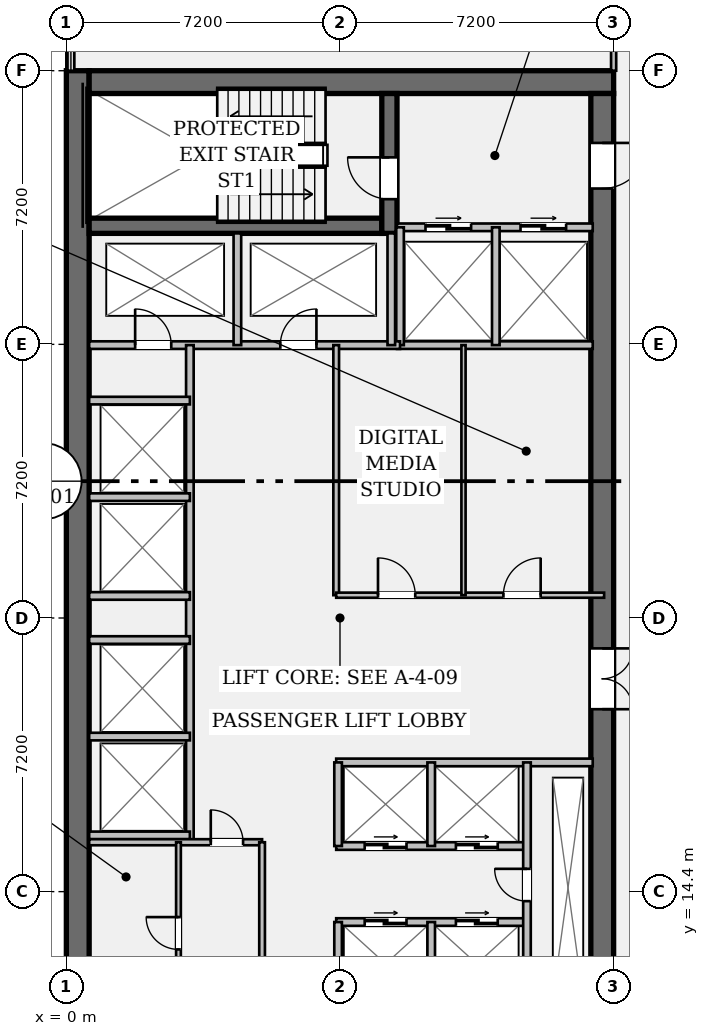
"""IFC4 building model, lengths in metres.
Left out: names, types, materials, properties, quantities, classifications, styles, units other than length and angle.
Written with IfcOpenShell. Run it as: python <this file> out.ifc"""

import sys

from ifc_helpers import new_model, si_unit, direction, frame, frame_2d, origin, place, context, subcontext, project, spatial, rectangle, extrude, element, fill, save


model = new_model("IFC4")
c1 = context("Model", 3, precision=1e-05, world=origin(), true_north=direction((0.0, 1.0)))
c2 = subcontext(c1, "Body", "Model", "MODEL_VIEW")
j1 = project(units=[si_unit("LENGTHUNIT", "METRE"), si_unit("PLANEANGLEUNIT", "RADIAN")], contexts=[c1])
p1 = place(None, origin())
s1 = spatial("IfcSite", under=j1, at=p1, CompositionType="ELEMENT")
p2 = place(p1, origin())
s2 = spatial("IfcBuilding", under=s1, at=p2, CompositionType="ELEMENT")
p3 = place(p2, frame((0.0, 0.0, 159.95)))
s3 = spatial("IfcBuildingStorey", under=s2, at=p3, CompositionType="ELEMENT", Elevation=159.95)
p4 = place(p3, frame((0.3, 7.2, 0.0), z_axis=(0.0, 0.0, 1.0), x_axis=(0.0, 1.0, 0.0)))
e1 = element("IfcWall", 1, at=p4, inside=s3, PredefinedType="SHEAR", context=c2, shape_type="SweptSolid", body=[
    extrude(rectangle(XDim=28.8, YDim=0.6, at=frame_2d((14.4, 0.0))), origin(), (0.0, 0.0, 1.0), 3.58),
])
p5 = place(p3, frame((0.6, 35.7, 0.0), z_axis=(0.0, 0.0, 1.0), x_axis=(1.0, 0.0, 0.0)))
e2 = element("IfcWall", 2, at=p5, inside=s3, PredefinedType="SHEAR", context=c2, shape_type="SweptSolid", body=[
    extrude(rectangle(XDim=13.8, YDim=0.6, at=frame_2d((6.9, 0.0))), origin(), (0.0, 0.0, 1.0), 3.58),
])
p6 = place(p3, frame((14.1, 35.4, 0.0), z_axis=(0.0, 0.0, 1.0), x_axis=(0.0, -1.0, 0.0)))
e3 = element("IfcWall", 3, at=p6, inside=s3, PredefinedType="SHEAR", context=c2, shape_type="SweptSolid", body=[
    extrude(rectangle(XDim=27.6, YDim=0.6, at=frame_2d((13.8, 0.0))), origin(), (0.0, 0.0, 1.0), 3.58),
])
p7 = place(p6, frame((1.3, 0.0, 0.0)))
e4 = element("IfcOpeningElement", 4, at=p7, cuts=e3, PredefinedType="OPENING", context=c2, shape_type="SweptSolid", body=[
    extrude(rectangle(XDim=1.2, YDim=2.15, at=frame_2d((0.6, 1.075))), frame((0.0, 0.312, 0.0), z_axis=(0.0, -1.0, 0.0), x_axis=(1.0, 0.0, 0.0)), (0.0, 0.0, 1.0), 0.624),
])
p8 = place(p6, frame((25.25, 0.0, 0.0)))
e5 = element("IfcOpeningElement", 5, at=p8, cuts=e3, PredefinedType="OPENING", context=c2, shape_type="SweptSolid", body=[
    extrude(rectangle(XDim=1.2, YDim=2.15, at=frame_2d((0.6, 1.075))), frame((0.0, 0.312, 0.0), z_axis=(0.0, -1.0, 0.0), x_axis=(1.0, 0.0, 0.0)), (0.0, 0.0, 1.0), 0.624),
])
p9 = place(p6, frame((14.6, 0.0, 0.0)))
e6 = element("IfcOpeningElement", 6, at=p9, cuts=e3, PredefinedType="OPENING", context=c2, shape_type="SweptSolid", body=[
    extrude(rectangle(XDim=1.6, YDim=2.2, at=frame_2d((0.8, 1.1))), frame((0.0, 0.312, 0.0), z_axis=(0.0, -1.0, 0.0), x_axis=(1.0, 0.0, 0.0)), (0.0, 0.0, 1.0), 0.624),
])
p10 = place(p3, frame((0.6, 31.92, 0.0), z_axis=(0.0, 0.0, 1.0), x_axis=(1.0, 0.0, 0.0)))
e7 = element("IfcWall", 7, at=p10, inside=s3, PredefinedType="SHEAR", context=c2, shape_type="SweptSolid", body=[
    extrude(rectangle(XDim=7.7, YDim=0.4, at=frame_2d((3.85, 0.0))), origin(), (0.0, 0.0, 1.0), 3.58),
])
p11 = place(p3, frame((8.5, 31.72, 0.0), z_axis=(0.0, 0.0, 1.0), x_axis=(0.0, 1.0, 0.0)))
e8 = element("IfcWall", 8, at=p11, inside=s3, PredefinedType="SHEAR", context=c2, shape_type="SweptSolid", body=[
    extrude(rectangle(XDim=3.68, YDim=0.4, at=frame_2d((1.84, 0.0))), origin(), (0.0, 0.0, 1.0), 3.58),
])
p12 = place(p11, frame((0.9, 0.0, 0.0)))
e9 = element("IfcOpeningElement", 9, at=p12, cuts=e8, PredefinedType="OPENING", context=c2, shape_type="SweptSolid", body=[
    extrude(rectangle(XDim=1.1, YDim=2.15, at=frame_2d((0.55, 1.075))), frame((0.0, 0.212, 0.0), z_axis=(0.0, -1.0, 0.0), x_axis=(1.0, 0.0, 0.0)), (0.0, 0.0, 1.0), 0.424),
])
p13 = place(p3, frame((8.7, 31.88, 0.0), z_axis=(0.0, 0.0, 1.0), x_axis=(1.0, 0.0, 0.0)))
e10 = element("IfcWall", 10, at=p13, inside=s3, PredefinedType="PARTITIONING", context=c2, shape_type="SweptSolid", body=[
    extrude(rectangle(XDim=5.15, YDim=0.2, at=frame_2d((2.575, 0.0))), origin(), (0.0, 0.0, 1.0), 3.58),
])
p14 = place(p13, frame((0.75, 0.0, 0.0)))
e11 = element("IfcOpeningElement", 11, at=p14, cuts=e10, PredefinedType="OPENING", context=c2, shape_type="SweptSolid", body=[
    extrude(rectangle(XDim=1.2, YDim=2.2, at=frame_2d((0.6, 1.1))), frame((0.0, 0.112, 0.0), z_axis=(0.0, -1.0, 0.0), x_axis=(1.0, 0.0, 0.0)), (0.0, 0.0, 1.0), 0.224),
])
p15 = place(p13, frame((3.25, 0.0, 0.0)))
e12 = element("IfcOpeningElement", 12, at=p15, cuts=e10, PredefinedType="OPENING", context=c2, shape_type="SweptSolid", body=[
    extrude(rectangle(XDim=1.2, YDim=2.2, at=frame_2d((0.6, 1.1))), frame((0.0, 0.112, 0.0), z_axis=(0.0, -1.0, 0.0), x_axis=(1.0, 0.0, 0.0)), (0.0, 0.0, 1.0), 0.224),
])
p16 = place(p3, frame((8.7, 28.78, 0.0), z_axis=(0.0, 0.0, 1.0), x_axis=(1.0, 0.0, 0.0)))
e13 = element("IfcWall", 13, at=p16, inside=s3, PredefinedType="PARTITIONING", context=c2, shape_type="SweptSolid", body=[
    extrude(rectangle(XDim=5.15, YDim=0.2, at=frame_2d((2.575, 0.0))), origin(), (0.0, 0.0, 1.0), 3.58),
])
for number, where, z_axis, x_axis in (
    (14, (8.78, 28.78, 0.0), (0.0, 0.0, 1.0), (0.0, 1.0, 0.0)),
    (15, (11.3, 28.78, 0.0), (0.0, 0.0, 1.0), (0.0, 1.0, 0.0)),
):
    element("IfcWall", number, at=place(p3, frame(where, z_axis=z_axis, x_axis=x_axis)), inside=s3, PredefinedType="PARTITIONING", context=c2, shape_type="SweptSolid", body=[
        extrude(rectangle(XDim=3.1, YDim=0.2, at=frame_2d((1.55, 0.0))), origin(), (0.0, 0.0, 1.0), 3.58),
    ])
p17 = place(p3, frame((0.6, 28.78, 0.0), z_axis=(0.0, 0.0, 1.0), x_axis=(1.0, 0.0, 0.0)))
e16 = element("IfcWall", 16, at=p17, inside=s3, PredefinedType="PARTITIONING", context=c2, shape_type="SweptSolid", body=[
    extrude(rectangle(XDim=8.18, YDim=0.2, at=frame_2d((4.09, 0.0))), origin(), (0.0, 0.0, 1.0), 3.58),
])
p18 = place(p17, frame((1.21, 0.0, 0.0)))
e17 = element("IfcOpeningElement", 17, at=p18, cuts=e16, PredefinedType="OPENING", context=c2, shape_type="SweptSolid", body=[
    extrude(rectangle(XDim=0.95, YDim=2.15, at=frame_2d((0.475, 1.075))), frame((0.0, 0.112, 0.0), z_axis=(0.0, -1.0, 0.0), x_axis=(1.0, 0.0, 0.0)), (0.0, 0.0, 1.0), 0.224),
])
p19 = place(p17, frame((5.03, 0.0, 0.0)))
e18 = element("IfcOpeningElement", 18, at=p19, cuts=e16, PredefinedType="OPENING", context=c2, shape_type="SweptSolid", body=[
    extrude(rectangle(XDim=0.95, YDim=2.15, at=frame_2d((0.475, 1.075))), frame((0.0, 0.112, 0.0), z_axis=(0.0, -1.0, 0.0), x_axis=(1.0, 0.0, 0.0)), (0.0, 0.0, 1.0), 0.224),
])
for number, where, z_axis, x_axis in (
    (19, (4.5, 28.78, 0.0), (0.0, 0.0, 1.0), (0.0, 1.0, 0.0)),
    (20, (8.55, 28.78, 0.0), (0.0, 0.0, 1.0), (0.0, 1.0, 0.0)),
):
    element("IfcWall", number, at=place(p3, frame(where, z_axis=z_axis, x_axis=x_axis)), inside=s3, PredefinedType="PARTITIONING", context=c2, shape_type="SweptSolid", body=[
        extrude(rectangle(XDim=2.94, YDim=0.2, at=frame_2d((1.47, 0.0))), origin(), (0.0, 0.0, 1.0), 3.58),
    ])
p20 = place(p3, frame((3.25, 15.7, 0.0), z_axis=(0.0, 0.0, 1.0), x_axis=(0.0, 1.0, 0.0)))
e21 = element("IfcWall", 21, at=p20, inside=s3, PredefinedType="PARTITIONING", context=c2, shape_type="SweptSolid", body=[
    extrude(rectangle(XDim=13.08, YDim=0.2, at=frame_2d((6.54, 0.0))), origin(), (0.0, 0.0, 1.0), 3.58),
])
for number, where, z_axis, x_axis in (
    (22, (0.6, 15.88, 0.0), (0.0, 0.0, 1.0), (1.0, 0.0, 0.0)),
    (23, (0.6, 18.48, 0.0), (0.0, 0.0, 1.0), (1.0, 0.0, 0.0)),
    (24, (0.6, 22.18, 0.0), (0.0, 0.0, 1.0), (1.0, 0.0, 0.0)),
    (25, (0.6, 24.78, 0.0), (0.0, 0.0, 1.0), (1.0, 0.0, 0.0)),
    (26, (0.6, 21.02, 0.0), (0.0, 0.0, 1.0), (1.0, 0.0, 0.0)),
    (27, (0.6, 27.32, 0.0), (0.0, 0.0, 1.0), (1.0, 0.0, 0.0)),
):
    element("IfcWall", number, at=place(p3, frame(where, z_axis=z_axis, x_axis=x_axis)), inside=s3, PredefinedType="PARTITIONING", context=c2, shape_type="SweptSolid", body=[
        extrude(rectangle(XDim=2.65, YDim=0.2, at=frame_2d((1.325, 0.0))), origin(), (0.0, 0.0, 1.0), 3.58),
    ])
p21 = place(p3, frame((7.1, 22.2, 0.0), z_axis=(0.0, 0.0, 1.0), x_axis=(0.0, 1.0, 0.0)))
e28 = element("IfcWall", 28, at=p21, inside=s3, PredefinedType="PARTITIONING", context=c2, shape_type="SweptSolid", body=[
    extrude(rectangle(XDim=6.58, YDim=0.15, at=frame_2d((3.29, 0.0))), origin(), (0.0, 0.0, 1.0), 3.58),
])
p22 = place(p3, frame((7.1, 22.2, 0.0), z_axis=(0.0, 0.0, 1.0), x_axis=(1.0, 0.0, 0.0)))
e29 = element("IfcWall", 29, at=p22, inside=s3, PredefinedType="PARTITIONING", context=c2, shape_type="SweptSolid", body=[
    extrude(rectangle(XDim=7.05, YDim=0.135, at=frame_2d((3.525, 0.0))), origin(), (0.0, 0.0, 1.0), 3.58),
])
p23 = place(p22, frame((1.1, 0.0, 0.0)))
e30 = element("IfcOpeningElement", 30, at=p23, cuts=e29, PredefinedType="OPENING", context=c2, shape_type="SweptSolid", body=[
    extrude(rectangle(XDim=0.98, YDim=2.15, at=frame_2d((0.49, 1.075))), frame((0.0, 0.08, 0.0), z_axis=(0.0, -1.0, 0.0), x_axis=(1.0, 0.0, 0.0)), (0.0, 0.0, 1.0), 0.159),
])
p24 = place(p22, frame((4.4, 0.0, 0.0)))
e31 = element("IfcOpeningElement", 31, at=p24, cuts=e29, PredefinedType="OPENING", context=c2, shape_type="SweptSolid", body=[
    extrude(rectangle(XDim=0.98, YDim=2.15, at=frame_2d((0.49, 1.075))), frame((0.0, 0.08, 0.0), z_axis=(0.0, -1.0, 0.0), x_axis=(1.0, 0.0, 0.0)), (0.0, 0.0, 1.0), 0.159),
])
p25 = place(p3, frame((10.45, 22.2, 0.0), z_axis=(0.0, 0.0, 1.0), x_axis=(0.0, 1.0, 0.0)))
e32 = element("IfcWall", 32, at=p25, inside=s3, PredefinedType="PARTITIONING", context=c2, shape_type="SweptSolid", body=[
    extrude(rectangle(XDim=6.58, YDim=0.11, at=frame_2d((3.29, 0.0))), origin(), (0.0, 0.0, 1.0), 3.58),
])
p26 = place(p3, frame((7.1, 17.8, 0.0), z_axis=(0.0, 0.0, 1.0), x_axis=(1.0, 0.0, 0.0)))
e33 = element("IfcWall", 33, at=p26, inside=s3, PredefinedType="PARTITIONING", context=c2, shape_type="SweptSolid", body=[
    extrude(rectangle(XDim=6.75, YDim=0.2, at=frame_2d((3.375, 0.0))), origin(), (0.0, 0.0, 1.0), 3.58),
])
p27 = place(p3, frame((7.1, 15.6, 0.0), z_axis=(0.0, 0.0, 1.0), x_axis=(1.0, 0.0, 0.0)))
e34 = element("IfcWall", 34, at=p27, inside=s3, PredefinedType="PARTITIONING", context=c2, shape_type="SweptSolid", body=[
    extrude(rectangle(XDim=5.02, YDim=0.2, at=frame_2d((2.51, 0.0))), origin(), (0.0, 0.0, 1.0), 3.58),
])
p28 = place(p27, frame((0.75, 0.0, 0.0)))
e35 = element("IfcOpeningElement", 35, at=p28, cuts=e34, PredefinedType="OPENING", context=c2, shape_type="SweptSolid", body=[
    extrude(rectangle(XDim=1.1, YDim=2.2, at=frame_2d((0.55, 1.1))), frame((0.0, 0.112, 0.0), z_axis=(0.0, -1.0, 0.0), x_axis=(1.0, 0.0, 0.0)), (0.0, 0.0, 1.0), 0.224),
])
p29 = place(p27, frame((3.15, 0.0, 0.0)))
e36 = element("IfcOpeningElement", 36, at=p29, cuts=e34, PredefinedType="OPENING", context=c2, shape_type="SweptSolid", body=[
    extrude(rectangle(XDim=1.1, YDim=2.2, at=frame_2d((0.55, 1.1))), frame((0.0, 0.112, 0.0), z_axis=(0.0, -1.0, 0.0), x_axis=(1.0, 0.0, 0.0)), (0.0, 0.0, 1.0), 0.224),
])
p30 = place(p3, frame((7.1, 13.6, 0.0), z_axis=(0.0, 0.0, 1.0), x_axis=(1.0, 0.0, 0.0)))
e37 = element("IfcWall", 37, at=p30, inside=s3, PredefinedType="PARTITIONING", context=c2, shape_type="SweptSolid", body=[
    extrude(rectangle(XDim=5.02, YDim=0.2, at=frame_2d((2.51, 0.0))), origin(), (0.0, 0.0, 1.0), 3.58),
])
p31 = place(p30, frame((0.75, 0.0, 0.0)))
e38 = element("IfcOpeningElement", 38, at=p31, cuts=e37, PredefinedType="OPENING", context=c2, shape_type="SweptSolid", body=[
    extrude(rectangle(XDim=1.1, YDim=2.2, at=frame_2d((0.55, 1.1))), frame((0.0, 0.112, 0.0), z_axis=(0.0, -1.0, 0.0), x_axis=(1.0, 0.0, 0.0)), (0.0, 0.0, 1.0), 0.224),
])
p32 = place(p30, frame((3.15, 0.0, 0.0)))
e39 = element("IfcOpeningElement", 39, at=p32, cuts=e37, PredefinedType="OPENING", context=c2, shape_type="SweptSolid", body=[
    extrude(rectangle(XDim=1.1, YDim=2.2, at=frame_2d((0.55, 1.1))), frame((0.0, 0.112, 0.0), z_axis=(0.0, -1.0, 0.0), x_axis=(1.0, 0.0, 0.0)), (0.0, 0.0, 1.0), 0.224),
])
p33 = place(p3, frame((7.15, 15.6, 0.0), z_axis=(0.0, 0.0, 1.0), x_axis=(0.0, 1.0, 0.0)))
e40 = element("IfcWall", 40, at=p33, inside=s3, PredefinedType="PARTITIONING", context=c2, shape_type="SweptSolid", body=[
    extrude(rectangle(XDim=2.2, YDim=0.2, at=frame_2d((1.1, 0.0))), origin(), (0.0, 0.0, 1.0), 3.58),
])
p34 = place(p3, frame((7.15, 11.2, 0.0), z_axis=(0.0, 0.0, 1.0), x_axis=(0.0, 1.0, 0.0)))
e41 = element("IfcWall", 41, at=p34, inside=s3, PredefinedType="PARTITIONING", context=c2, shape_type="SweptSolid", body=[
    extrude(rectangle(XDim=2.4, YDim=0.2, at=frame_2d((1.2, 0.0))), origin(), (0.0, 0.0, 1.0), 3.58),
])
p35 = place(p3, frame((9.6, 15.6, 0.0), z_axis=(0.0, 0.0, 1.0), x_axis=(0.0, 1.0, 0.0)))
e42 = element("IfcWall", 42, at=p35, inside=s3, PredefinedType="PARTITIONING", context=c2, shape_type="SweptSolid", body=[
    extrude(rectangle(XDim=2.2, YDim=0.2, at=frame_2d((1.1, 0.0))), origin(), (0.0, 0.0, 1.0), 3.58),
])
p36 = place(p3, frame((9.6, 11.2, 0.0), z_axis=(0.0, 0.0, 1.0), x_axis=(0.0, 1.0, 0.0)))
e43 = element("IfcWall", 43, at=p36, inside=s3, PredefinedType="PARTITIONING", context=c2, shape_type="SweptSolid", body=[
    extrude(rectangle(XDim=2.4, YDim=0.2, at=frame_2d((1.2, 0.0))), origin(), (0.0, 0.0, 1.0), 3.58),
])
p37 = place(p3, frame((12.12, 11.2, 0.0), z_axis=(0.0, 0.0, 1.0), x_axis=(0.0, 1.0, 0.0)))
e44 = element("IfcWall", 44, at=p37, inside=s3, PredefinedType="PARTITIONING", context=c2, shape_type="SweptSolid", body=[
    extrude(rectangle(XDim=6.6, YDim=0.2, at=frame_2d((3.3, 0.0))), origin(), (0.0, 0.0, 1.0), 3.58),
])
p38 = place(p37, frame((2.95, 0.0, 0.0)))
e45 = element("IfcOpeningElement", 45, at=p38, cuts=e44, PredefinedType="OPENING", context=c2, shape_type="SweptSolid", body=[
    extrude(rectangle(XDim=0.85, YDim=2.15, at=frame_2d((0.425, 1.075))), frame((0.0, 0.112, 0.0), z_axis=(0.0, -1.0, 0.0), x_axis=(1.0, 0.0, 0.0)), (0.0, 0.0, 1.0), 0.224),
])
p39 = place(p3, frame((0.6, 15.7, 0.0), z_axis=(0.0, 0.0, 1.0), x_axis=(1.0, 0.0, 0.0)))
e46 = element("IfcWall", 46, at=p39, inside=s3, PredefinedType="PARTITIONING", context=c2, shape_type="SweptSolid", body=[
    extrude(rectangle(XDim=4.55, YDim=0.16, at=frame_2d((2.275, 0.0))), origin(), (0.0, 0.0, 1.0), 3.58),
])
p40 = place(p39, frame((3.2, 0.0, 0.0)))
e47 = element("IfcOpeningElement", 47, at=p40, cuts=e46, PredefinedType="OPENING", context=c2, shape_type="SweptSolid", body=[
    extrude(rectangle(XDim=0.85, YDim=2.15, at=frame_2d((0.425, 1.075))), frame((0.0, 0.092, 0.0), z_axis=(0.0, -1.0, 0.0), x_axis=(1.0, 0.0, 0.0)), (0.0, 0.0, 1.0), 0.184),
])
p41 = place(p3, frame((5.15, 11.28, 0.0), z_axis=(0.0, 0.0, 1.0), x_axis=(0.0, 1.0, 0.0)))
e48 = element("IfcWall", 48, at=p41, inside=s3, PredefinedType="PARTITIONING", context=c2, shape_type="SweptSolid", body=[
    extrude(rectangle(XDim=4.42, YDim=0.15, at=frame_2d((2.21, 0.0))), origin(), (0.0, 0.0, 1.0), 3.58),
])
p42 = place(p3, frame((2.95, 11.28, 0.0), z_axis=(0.0, 0.0, 1.0), x_axis=(0.0, 1.0, 0.0)))
e49 = element("IfcWall", 49, at=p42, inside=s3, PredefinedType="PARTITIONING", context=c2, shape_type="SweptSolid", body=[
    extrude(rectangle(XDim=4.42, YDim=0.125, at=frame_2d((2.21, 0.0))), origin(), (0.0, 0.0, 1.0), 3.58),
])
p43 = place(p42, frame((1.6, 0.0, 0.0)))
e50 = element("IfcOpeningElement", 50, at=p43, cuts=e49, PredefinedType="OPENING", context=c2, shape_type="SweptSolid", body=[
    extrude(rectangle(XDim=0.85, YDim=2.15, at=frame_2d((0.425, 1.075))), frame((0.0, 0.074, 0.0), z_axis=(0.0, -1.0, 0.0), x_axis=(1.0, 0.0, 0.0)), (0.0, 0.0, 1.0), 0.149),
])
p44 = place(p3, frame((14.4, 36.0, 0.0), z_axis=(0.0, 0.0, 1.0), x_axis=(0.0, 1.0, 0.0)))
e51 = element("IfcWall", 51, at=p44, inside=s3, PredefinedType="PARTITIONING", context=c2, shape_type="SweptSolid", body=[
    extrude(rectangle(XDim=7.08, YDim=0.135, at=frame_2d((3.54, 0.0))), origin(), (0.0, 0.0, 1.0), 2.869),
])
p45 = place(p44, frame((0.85, 0.0, 0.0)))
e52 = element("IfcOpeningElement", 52, at=p45, cuts=e51, PredefinedType="OPENING", context=c2, shape_type="SweptSolid", body=[
    extrude(rectangle(XDim=0.98, YDim=2.15, at=frame_2d((0.49, 1.075))), frame((0.0, 0.08, 0.0), z_axis=(0.0, -1.0, 0.0), x_axis=(1.0, 0.0, 0.0)), (0.0, 0.0, 1.0), 0.159),
])
p46 = place(p12, origin())
e53 = element("IfcDoor", 53, at=p46, inside=s3, OperationType="SINGLE_SWING_RIGHT", PredefinedType="DOOR", context=c2, shape_type="SweptSolid", body=[
    extrude(rectangle(XDim=1.1, YDim=2.15, at=frame_2d((0.55, 1.075))), frame((0.0, 0.025, 0.0), z_axis=(0.0, -1.0, 0.0), x_axis=(1.0, 0.0, 0.0)), (0.0, 0.0, 1.0), 0.05),
])
fill(e9, e53)
p47 = place(p7, origin())
e54 = element("IfcDoor", 54, at=p47, inside=s3, OperationType="SINGLE_SWING_LEFT", PredefinedType="DOOR", context=c2, shape_type="SweptSolid", body=[
    extrude(rectangle(XDim=1.2, YDim=2.15, at=frame_2d((0.6, 1.075))), frame((0.0, 0.025, 0.0), z_axis=(0.0, -1.0, 0.0), x_axis=(1.0, 0.0, 0.0)), (0.0, 0.0, 1.0), 0.05),
])
fill(e4, e54)
p48 = place(p14, origin())
e55 = element("IfcDoor", 55, at=p48, inside=s3, OperationType="DOUBLE_DOOR_SLIDING", PredefinedType="DOOR", context=c2, shape_type="SweptSolid", body=[
    extrude(rectangle(XDim=1.2, YDim=2.2, at=frame_2d((0.6, 1.1))), frame((0.0, 0.025, 0.0), z_axis=(0.0, -1.0, 0.0), x_axis=(1.0, 0.0, 0.0)), (0.0, 0.0, 1.0), 0.05),
])
fill(e11, e55)
p49 = place(p15, origin())
e56 = element("IfcDoor", 56, at=p49, inside=s3, OperationType="DOUBLE_DOOR_SLIDING", PredefinedType="DOOR", context=c2, shape_type="SweptSolid", body=[
    extrude(rectangle(XDim=1.2, YDim=2.2, at=frame_2d((0.6, 1.1))), frame((0.0, 0.025, 0.0), z_axis=(0.0, -1.0, 0.0), x_axis=(1.0, 0.0, 0.0)), (0.0, 0.0, 1.0), 0.05),
])
fill(e12, e56)
p50 = place(p18, origin())
e57 = element("IfcDoor", 57, at=p50, inside=s3, OperationType="SINGLE_SWING_LEFT", PredefinedType="DOOR", context=c2, shape_type="SweptSolid", body=[
    extrude(rectangle(XDim=0.95, YDim=2.15, at=frame_2d((0.475, 1.075))), frame((0.0, 0.025, 0.0), z_axis=(0.0, -1.0, 0.0), x_axis=(1.0, 0.0, 0.0)), (0.0, 0.0, 1.0), 0.05),
])
fill(e17, e57)
p51 = place(p19, origin())
e58 = element("IfcDoor", 58, at=p51, inside=s3, OperationType="SINGLE_SWING_RIGHT", PredefinedType="DOOR", context=c2, shape_type="SweptSolid", body=[
    extrude(rectangle(XDim=0.95, YDim=2.15, at=frame_2d((0.475, 1.075))), frame((0.0, 0.025, 0.0), z_axis=(0.0, -1.0, 0.0), x_axis=(1.0, 0.0, 0.0)), (0.0, 0.0, 1.0), 0.05),
])
fill(e18, e58)
p52 = place(p9, origin())
e59 = element("IfcDoor", 59, at=p52, inside=s3, OperationType="DOUBLE_DOOR_SINGLE_SWING", PredefinedType="DOOR", context=c2, shape_type="SweptSolid", body=[
    extrude(rectangle(XDim=1.6, YDim=2.2, at=frame_2d((0.8, 1.1))), frame((0.0, 0.025, 0.0), z_axis=(0.0, -1.0, 0.0), x_axis=(1.0, 0.0, 0.0)), (0.0, 0.0, 1.0), 0.05),
])
fill(e6, e59)
p53 = place(p23, origin())
e60 = element("IfcDoor", 60, at=p53, inside=s3, OperationType="SINGLE_SWING_LEFT", PredefinedType="DOOR", context=c2, shape_type="SweptSolid", body=[
    extrude(rectangle(XDim=0.98, YDim=2.15, at=frame_2d((0.49, 1.075))), frame((0.0, 0.025, 0.0), z_axis=(0.0, -1.0, 0.0), x_axis=(1.0, 0.0, 0.0)), (0.0, 0.0, 1.0), 0.05),
])
fill(e30, e60)
p54 = place(p24, origin())
e61 = element("IfcDoor", 61, at=p54, inside=s3, OperationType="SINGLE_SWING_RIGHT", PredefinedType="DOOR", context=c2, shape_type="SweptSolid", body=[
    extrude(rectangle(XDim=0.98, YDim=2.15, at=frame_2d((0.49, 1.075))), frame((0.0, 0.025, 0.0), z_axis=(0.0, -1.0, 0.0), x_axis=(1.0, 0.0, 0.0)), (0.0, 0.0, 1.0), 0.05),
])
fill(e31, e61)
p55 = place(p38, origin())
e62 = element("IfcDoor", 62, at=p55, inside=s3, OperationType="SINGLE_SWING_RIGHT", PredefinedType="DOOR", context=c2, shape_type="SweptSolid", body=[
    extrude(rectangle(XDim=0.85, YDim=2.15, at=frame_2d((0.425, 1.075))), frame((0.0, 0.025, 0.0), z_axis=(0.0, -1.0, 0.0), x_axis=(1.0, 0.0, 0.0)), (0.0, 0.0, 1.0), 0.05),
])
fill(e45, e62)
p56 = place(p28, origin())
e63 = element("IfcDoor", 63, at=p56, inside=s3, OperationType="DOUBLE_DOOR_SLIDING", PredefinedType="DOOR", context=c2, shape_type="SweptSolid", body=[
    extrude(rectangle(XDim=1.1, YDim=2.2, at=frame_2d((0.55, 1.1))), frame((0.0, 0.025, 0.0), z_axis=(0.0, -1.0, 0.0), x_axis=(1.0, 0.0, 0.0)), (0.0, 0.0, 1.0), 0.05),
])
fill(e35, e63)
p57 = place(p29, origin())
e64 = element("IfcDoor", 64, at=p57, inside=s3, OperationType="DOUBLE_DOOR_SLIDING", PredefinedType="DOOR", context=c2, shape_type="SweptSolid", body=[
    extrude(rectangle(XDim=1.1, YDim=2.2, at=frame_2d((0.55, 1.1))), frame((0.0, 0.025, 0.0), z_axis=(0.0, -1.0, 0.0), x_axis=(1.0, 0.0, 0.0)), (0.0, 0.0, 1.0), 0.05),
])
fill(e36, e64)
p58 = place(p31, origin())
e65 = element("IfcDoor", 65, at=p58, inside=s3, OperationType="DOUBLE_DOOR_SLIDING", PredefinedType="DOOR", context=c2, shape_type="SweptSolid", body=[
    extrude(rectangle(XDim=1.1, YDim=2.2, at=frame_2d((0.55, 1.1))), frame((0.0, 0.025, 0.0), z_axis=(0.0, -1.0, 0.0), x_axis=(1.0, 0.0, 0.0)), (0.0, 0.0, 1.0), 0.05),
])
fill(e38, e65)
p59 = place(p32, origin())
e66 = element("IfcDoor", 66, at=p59, inside=s3, OperationType="DOUBLE_DOOR_SLIDING", PredefinedType="DOOR", context=c2, shape_type="SweptSolid", body=[
    extrude(rectangle(XDim=1.1, YDim=2.2, at=frame_2d((0.55, 1.1))), frame((0.0, 0.025, 0.0), z_axis=(0.0, -1.0, 0.0), x_axis=(1.0, 0.0, 0.0)), (0.0, 0.0, 1.0), 0.05),
])
fill(e39, e66)
p60 = place(p40, origin())
e67 = element("IfcDoor", 67, at=p60, inside=s3, OperationType="SINGLE_SWING_LEFT", PredefinedType="DOOR", context=c2, shape_type="SweptSolid", body=[
    extrude(rectangle(XDim=0.85, YDim=2.15, at=frame_2d((0.425, 1.075))), frame((0.0, 0.025, 0.0), z_axis=(0.0, -1.0, 0.0), x_axis=(1.0, 0.0, 0.0)), (0.0, 0.0, 1.0), 0.05),
])
fill(e47, e67)
p61 = place(p43, origin())
e68 = element("IfcDoor", 68, at=p61, inside=s3, OperationType="SINGLE_SWING_RIGHT", PredefinedType="DOOR", context=c2, shape_type="SweptSolid", body=[
    extrude(rectangle(XDim=0.85, YDim=2.15, at=frame_2d((0.425, 1.075))), frame((0.0, 0.025, 0.0), z_axis=(0.0, -1.0, 0.0), x_axis=(1.0, 0.0, 0.0)), (0.0, 0.0, 1.0), 0.05),
])
fill(e50, e68)
save(model, sys.argv[1])
